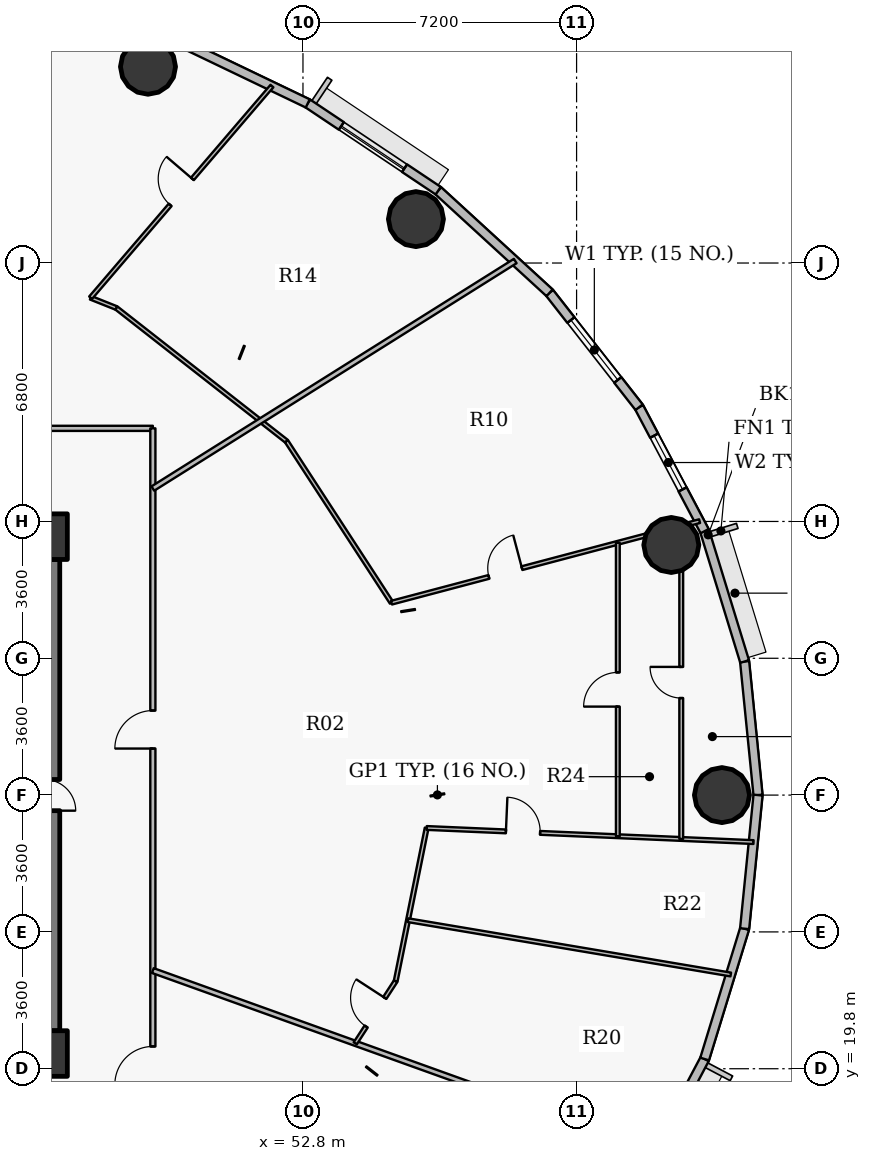
"""IFC4 building model, lengths in metres.
Left out: names, types, materials, properties, quantities, classifications, styles, units other than length and angle.
Written with IfcOpenShell. Run it as: python <this file> out.ifc"""

import sys

from ifc_helpers import new_model, si_unit, direction, frame, frame_2d, origin, origin_2d, place, context, subcontext, project, spatial, rectangle, hollow_circle, extrude, source, transform, mapped, element, fill, save


model = new_model("IFC4")
c1 = context("Model", 3, precision=1e-05, world=origin(), true_north=direction((0.0, 1.0)))
c2 = subcontext(c1, "Body", "Model", "MODEL_VIEW")
j1 = project(units=[si_unit("LENGTHUNIT", "METRE"), si_unit("PLANEANGLEUNIT", "RADIAN")], contexts=[c1])
p1 = place(None, origin())
s1 = spatial("IfcSite", under=j1, at=p1, CompositionType="ELEMENT")
p2 = place(p1, origin())
s2 = spatial("IfcBuilding", under=s1, at=p2, CompositionType="ELEMENT")
p3 = place(p2, frame((0.0, 0.0, 115.95)))
s3 = spatial("IfcBuildingStorey", under=s2, at=p3, CompositionType="ELEMENT", Elevation=115.95)
for number, where, z_axis, x_axis in (
    (1, (46.0, 20.2, 0.0), (0.0, 0.0, 1.0), (1.0, 0.0, 0.0)),
    (2, (46.0, 33.8, 0.0), (0.0, 0.0, 1.0), (1.0, 0.0, 0.0)),
):
    element("IfcColumn", number, at=place(p3, frame(where, z_axis=z_axis, x_axis=x_axis)), inside=s3, PredefinedType="COLUMN", context=c2, shape_type="SweptSolid", body=[
        extrude(rectangle(XDim=1.2, YDim=1.2, at=origin_2d()), origin(), (0.0, 0.0, 1.0), 3.75),
    ])
p4 = place(p3, frame((46.0, 33.2, 0.0), z_axis=(0.0, 0.0, 1.0), x_axis=(0.0, -1.0, 0.0)))
e3 = element("IfcWall", 3, at=p4, inside=s3, PredefinedType="SHEAR", context=c2, shape_type="SweptSolid", body=[
    extrude(rectangle(XDim=12.4, YDim=0.8, at=frame_2d((6.2, 0.0))), origin(), (0.0, 0.0, 1.0), 2.95),
])
p5 = place(p4, frame((5.79, 0.0, 0.0)))
e4 = element("IfcOpeningElement", 4, at=p5, cuts=e3, PredefinedType="OPENING", context=c2, shape_type="SweptSolid", body=[
    extrude(rectangle(XDim=0.82, YDim=2.1, at=origin_2d()), frame((0.41, 0.41, 1.05), z_axis=(0.0, -1.0, 0.0), x_axis=(1.0, 0.0, 0.0)), (0.0, 0.0, 1.0), 0.82),
])
for number, where, z_axis, x_axis in (
    (5, (63.825, 27.0, 0.0), (0.0, 0.0, 1.0), (1.0, 0.0, 0.0)),
    (6, (62.493, 33.581, 0.0), (0.0, 0.0, 1.0), (1.0, 0.0, 0.0)),
    (7, (55.773, 42.156, 0.0), (0.0, 0.0, 1.0), (1.0, 0.0, 0.0)),
    (8, (48.722, 46.165, 0.0), (0.0, 0.0, 1.0), (1.0, 0.0, 0.0)),
):
    element("IfcColumn", number, at=place(p3, frame(where, z_axis=z_axis, x_axis=x_axis)), inside=s3, PredefinedType="COLUMN", context=c2, shape_type="SweptSolid", body=[
        extrude(hollow_circle(Radius=0.725, WallThickness=0.042, at=origin_2d()), origin(), (0.0, 0.0, 1.0), 3.75),
    ])
p6 = place(p3, frame((64.422, 30.515, 0.0), z_axis=(0.0, 0.0, 1.0), x_axis=(0.099989468229, -0.994988495533, 0.0)))
e9 = element("IfcWall", 9, at=p6, inside=s3, PredefinedType="SOLIDWALL", context=c2, shape_type="SweptSolid", body=[
    extrude(rectangle(XDim=3.533, YDim=0.24, at=frame_2d((1.767, 0.0))), origin(), (0.0, 0.0, 1.0), 3.5),
])
p7 = place(p3, frame((63.37, 33.945, 0.0), z_axis=(0.0, 0.0, 1.0), x_axis=(0.293124431344, -0.956074300329, 0.0)))
e10 = element("IfcWall", 10, at=p7, inside=s3, PredefinedType="SOLIDWALL", context=c2, shape_type="SweptSolid", body=[
    extrude(rectangle(XDim=3.587, YDim=0.24, at=frame_2d((1.793, 0.0))), origin(), (0.0, 0.0, 1.0), 3.5),
])
p8 = place(p3, frame((61.645, 37.206, 0.0), z_axis=(0.0, 0.0, 1.0), x_axis=(0.467614004126, -0.883932770716, 0.0)))
e11 = element("IfcWall", 11, at=p8, inside=s3, PredefinedType="SOLIDWALL", context=c2, shape_type="SweptSolid", body=[
    extrude(rectangle(XDim=3.689, YDim=0.24, at=frame_2d((1.844, 0.0))), origin(), (0.0, 0.0, 1.0), 3.5),
])
p9 = place(p8, frame((0.846, 0.0, 0.9)))
e12 = element("IfcOpeningElement", 12, at=p9, cuts=e11, PredefinedType="OPENING", context=c2, shape_type="SweptSolid", body=[
    extrude(rectangle(XDim=1.6, YDim=1.75, at=origin_2d()), frame((0.8, 0.13, 0.875), z_axis=(0.0, -1.0, 0.0), x_axis=(1.0, 0.0, 0.0)), (0.0, 0.0, 1.0), 0.26),
])
p10 = place(p3, frame((59.289, 40.217, 0.0), z_axis=(0.0, 0.0, 1.0), x_axis=(0.616272103517, -0.787533297345, 0.0)))
e13 = element("IfcWall", 13, at=p10, inside=s3, PredefinedType="SOLIDWALL", context=c2, shape_type="SweptSolid", body=[
    extrude(rectangle(XDim=3.823, YDim=0.24, at=frame_2d((1.912, 0.0))), origin(), (0.0, 0.0, 1.0), 3.5),
])
p11 = place(p10, frame((0.912, 0.0, 0.9)))
e14 = element("IfcOpeningElement", 14, at=p11, cuts=e13, PredefinedType="OPENING", context=c2, shape_type="SweptSolid", body=[
    extrude(rectangle(XDim=2.0, YDim=1.75, at=origin_2d()), frame((1.0, 0.13, 0.875), z_axis=(0.0, -1.0, 0.0), x_axis=(1.0, 0.0, 0.0)), (0.0, 0.0, 1.0), 0.26),
])
p12 = place(p3, frame((56.358, 42.903, 0.0), z_axis=(0.0, 0.0, 1.0), x_axis=(0.737113356241, -0.675769117414, 0.0)))
e15 = element("IfcWall", 15, at=p12, inside=s3, PredefinedType="SOLIDWALL", context=c2, shape_type="SweptSolid", body=[
    extrude(rectangle(XDim=3.976, YDim=0.24, at=frame_2d((1.988, 0.0))), origin(), (0.0, 0.0, 1.0), 3.5),
])
p13 = place(p3, frame((52.925, 45.199, 0.0), z_axis=(0.0, 0.0, 1.0), x_axis=(0.831221811447, -0.555940914284, 0.0)))
e16 = element("IfcWall", 16, at=p13, inside=s3, PredefinedType="SOLIDWALL", context=c2, shape_type="SweptSolid", body=[
    extrude(rectangle(XDim=4.13, YDim=0.24, at=frame_2d((2.065, 0.0))), origin(), (0.0, 0.0, 1.0), 3.5),
])
p14 = place(p13, frame((1.065, 0.0, 0.9)))
e17 = element("IfcOpeningElement", 17, at=p14, cuts=e16, PredefinedType="OPENING", context=c2, shape_type="SweptSolid", body=[
    extrude(rectangle(XDim=2.0, YDim=1.75, at=origin_2d()), frame((1.0, 0.13, 0.875), z_axis=(0.0, -1.0, 0.0), x_axis=(1.0, 0.0, 0.0)), (0.0, 0.0, 1.0), 0.26),
])
p15 = place(p3, frame((49.074, 47.047, 0.0), z_axis=(0.0, 0.0, 1.0), x_axis=(0.901589935876, -0.432591709962, 0.0)))
e18 = element("IfcWall", 18, at=p15, inside=s3, PredefinedType="SOLIDWALL", context=c2, shape_type="SweptSolid", body=[
    extrude(rectangle(XDim=4.272, YDim=0.24, at=frame_2d((2.136, 0.0))), origin(), (0.0, 0.0, 1.0), 3.5),
])
p16 = place(p3, frame((63.37, 20.055, 0.0), z_axis=(0.0, 0.0, 1.0), x_axis=(-0.467614004126, -0.883932770716, 0.0)))
e19 = element("IfcWall", 19, at=p16, inside=s3, PredefinedType="SOLIDWALL", context=c2, shape_type="SweptSolid", body=[
    extrude(rectangle(XDim=3.689, YDim=0.24, at=frame_2d((1.844, 0.0))), origin(), (0.0, 0.0, 1.0), 3.5),
])
p17 = place(p16, frame((0.778, 0.0, 0.9)))
e20 = element("IfcOpeningElement", 20, at=p17, cuts=e19, PredefinedType="OPENING", context=c2, shape_type="SweptSolid", body=[
    extrude(rectangle(XDim=1.6, YDim=1.75, at=origin_2d()), frame((0.8, 0.13, 0.875), z_axis=(0.0, -1.0, 0.0), x_axis=(1.0, 0.0, 0.0)), (0.0, 0.0, 1.0), 0.26),
])
p18 = place(p3, frame((64.422, 23.485, 0.0), z_axis=(0.0, 0.0, 1.0), x_axis=(-0.293124431344, -0.956074300329, 0.0)))
e21 = element("IfcWall", 21, at=p18, inside=s3, PredefinedType="SOLIDWALL", context=c2, shape_type="SweptSolid", body=[
    extrude(rectangle(XDim=3.587, YDim=0.24, at=frame_2d((1.793, 0.0))), origin(), (0.0, 0.0, 1.0), 3.5),
])
p19 = place(p3, frame((64.775, 27.0, 0.0), z_axis=(0.0, 0.0, 1.0), x_axis=(-0.099989468229, -0.994988495533, 0.0)))
e22 = element("IfcWall", 22, at=p19, inside=s3, PredefinedType="SOLIDWALL", context=c2, shape_type="SweptSolid", body=[
    extrude(rectangle(XDim=3.533, YDim=0.24, at=frame_2d((1.767, 0.0))), origin(), (0.0, 0.0, 1.0), 3.5),
])
p20 = place(p3, frame((38.477, 36.65, 0.0), z_axis=(0.0, 0.0, 1.0), x_axis=(1.0, 0.0, 0.0)))
e23 = element("IfcWall", 23, at=p20, inside=s3, PredefinedType="PARTITIONING", context=c2, shape_type="SweptSolid", body=[
    extrude(rectangle(XDim=10.373, YDim=0.135, at=frame_2d((5.187, 0.0))), origin(), (0.0, 0.0, 1.0), 2.935),
])
p21 = place(p20, frame((5.621, 0.0, 0.0)))
e24 = element("IfcOpeningElement", 24, at=p21, cuts=e23, PredefinedType="OPENING", context=c2, shape_type="SweptSolid", body=[
    extrude(rectangle(XDim=1.0, YDim=2.15, at=origin_2d()), frame((0.5, 0.078, 1.075), z_axis=(0.0, -1.0, 0.0), x_axis=(1.0, 0.0, 0.0)), (0.0, 0.0, 1.0), 0.155),
])
p22 = place(p3, frame((47.212, 40.087, 0.0), z_axis=(0.0, 0.0, 1.0), x_axis=(0.928752817467, -0.370699614307, 0.0)))
e25 = element("IfcWall", 25, at=p22, inside=s3, PredefinedType="PARTITIONING", context=c2, shape_type="SweptSolid", body=[
    extrude(rectangle(XDim=0.731, YDim=0.1, at=frame_2d((0.365, 0.0))), origin(), (0.0, 0.0, 1.0), 3.185),
])
p23 = place(p3, frame((47.212, 40.087, 0.0), z_axis=(0.0, 0.0, 1.0), x_axis=(0.650621399292, 0.759402261508, 0.0)))
e26 = element("IfcWall", 26, at=p23, inside=s3, PredefinedType="PARTITIONING", context=c2, shape_type="SweptSolid", body=[
    extrude(rectangle(XDim=7.334, YDim=0.1, at=frame_2d((3.667, 0.0))), origin(), (0.0, 0.0, 1.0), 2.935),
])
p24 = place(p23, frame((3.217, 0.0, 0.0)))
e27 = element("IfcOpeningElement", 27, at=p24, cuts=e26, PredefinedType="OPENING", context=c2, shape_type="SweptSolid", body=[
    extrude(rectangle(XDim=0.9, YDim=2.1, at=origin_2d()), frame((0.45, 0.06, 1.05), z_axis=(0.0, -1.0, 0.0), x_axis=(1.0, 0.0, 0.0)), (0.0, 0.0, 1.0), 0.12),
])
p25 = place(p3, frame((47.891, 39.816, 0.0), z_axis=(0.0, 0.0, 1.0), x_axis=(0.787338202739, -0.616521333376, 0.0)))
e28 = element("IfcWall", 28, at=p25, inside=s3, PredefinedType="PARTITIONING", context=c2, shape_type="SweptSolid", body=[
    extrude(rectangle(XDim=5.684, YDim=0.1, at=frame_2d((2.842, 0.0))), origin(), (0.0, 0.0, 1.0), 2.935),
])
p26 = place(p3, frame((48.85, 17.35, 0.0), z_axis=(0.0, 0.0, 1.0), x_axis=(0.0, 1.0, 0.0)))
e29 = element("IfcWall", 29, at=p26, inside=s3, PredefinedType="PARTITIONING", context=c2, shape_type="SweptSolid", body=[
    extrude(rectangle(XDim=19.3, YDim=0.135, at=frame_2d((9.65, 0.0))), origin(), (0.0, 0.0, 1.0), 2.935),
])
p27 = place(p26, frame((2.036, 0.0, 0.0)))
e30 = element("IfcOpeningElement", 30, at=p27, cuts=e29, PredefinedType="OPENING", context=c2, shape_type="SweptSolid", body=[
    extrude(rectangle(XDim=1.0, YDim=2.15, at=origin_2d()), frame((0.5, 0.078, 1.075), z_axis=(0.0, -1.0, 0.0), x_axis=(1.0, 0.0, 0.0)), (0.0, 0.0, 1.0), 0.155),
])
p28 = place(p26, frame((10.875, 0.0, 0.0)))
e31 = element("IfcOpeningElement", 31, at=p28, cuts=e29, PredefinedType="OPENING", context=c2, shape_type="SweptSolid", body=[
    extrude(rectangle(XDim=1.0, YDim=2.15, at=origin_2d()), frame((0.5, 0.078, 1.075), z_axis=(0.0, -1.0, 0.0), x_axis=(1.0, 0.0, 0.0)), (0.0, 0.0, 1.0), 0.155),
])
p29 = place(p3, frame((48.85, 22.383, 0.0), z_axis=(0.0, 0.0, 1.0), x_axis=(0.941089213164, -0.338158384292, 0.0)))
e32 = element("IfcWall", 32, at=p29, inside=s3, PredefinedType="PARTITIONING", context=c2, shape_type="SweptSolid", body=[
    extrude(rectangle(XDim=14.069, YDim=0.135, at=frame_2d((7.035, 0.0))), origin(), (0.0, 0.0, 1.0), 2.935),
])
p30 = place(p3, frame((48.85, 35.066, 0.0), z_axis=(0.0, 0.0, 1.0), x_axis=(0.846963568038, 0.531650932866, 0.0)))
e33 = element("IfcWall", 33, at=p30, inside=s3, PredefinedType="PARTITIONING", context=c2, shape_type="SweptSolid", body=[
    extrude(rectangle(XDim=11.258, YDim=0.135, at=frame_2d((5.629, 0.0))), origin(), (0.0, 0.0, 1.0), 2.935),
])
p31 = place(p3, frame((52.366, 36.311, 0.0), z_axis=(0.0, 0.0, 1.0), x_axis=(0.545394651961, -0.838179380331, 0.0)))
e34 = element("IfcWall", 34, at=p31, inside=s3, PredefinedType="PARTITIONING", context=c2, shape_type="SweptSolid", body=[
    extrude(rectangle(XDim=5.068, YDim=0.1, at=frame_2d((2.534, 0.0))), origin(), (0.0, 0.0, 1.0), 3.5),
])
p32 = place(p3, frame((54.176, 20.469, 0.0), z_axis=(0.0, 0.0, 1.0), x_axis=(0.545370803514, 0.838194897786, 0.0)))
e35 = element("IfcWall", 35, at=p32, inside=s3, PredefinedType="PARTITIONING", context=c2, shape_type="SweptSolid", body=[
    extrude(rectangle(XDim=1.952, YDim=0.1, at=frame_2d((0.976, 0.0))), origin(), (0.0, 0.0, 1.0), 3.5),
])
p33 = place(p32, frame((0.526, 0.0, 0.0)))
e36 = element("IfcOpeningElement", 36, at=p33, cuts=e35, PredefinedType="OPENING", context=c2, shape_type="SweptSolid", body=[
    extrude(rectangle(XDim=0.9, YDim=2.1, at=origin_2d()), frame((0.45, 0.06, 1.05), z_axis=(0.0, -1.0, 0.0), x_axis=(1.0, 0.0, 0.0)), (0.0, 0.0, 1.0), 0.12),
])
p34 = place(p3, frame((55.131, 32.063, 0.0), z_axis=(0.0, 0.0, 1.0), x_axis=(0.96671793708, 0.255844542893, 0.0)))
e37 = element("IfcWall", 37, at=p34, inside=s3, PredefinedType="PARTITIONING", context=c2, shape_type="SweptSolid", body=[
    extrude(rectangle(XDim=8.385, YDim=0.1, at=frame_2d((4.192, 0.0))), origin(), (0.0, 0.0, 1.0), 2.935),
])
p35 = place(p34, frame((2.65, 0.0, 0.0)))
e38 = element("IfcOpeningElement", 38, at=p35, cuts=e37, PredefinedType="OPENING", context=c2, shape_type="SweptSolid", body=[
    extrude(rectangle(XDim=0.9, YDim=2.1, at=origin_2d()), frame((0.45, 0.06, 1.05), z_axis=(0.0, -1.0, 0.0), x_axis=(1.0, 0.0, 0.0)), (0.0, 0.0, 1.0), 0.12),
])
p36 = place(p3, frame((55.24, 22.105, 0.0), z_axis=(0.0, 0.0, 1.0), x_axis=(0.198205355444, 0.980160515973, 0.0)))
e39 = element("IfcWall", 39, at=p36, inside=s3, PredefinedType="PARTITIONING", context=c2, shape_type="SweptSolid", body=[
    extrude(rectangle(XDim=4.112, YDim=0.1, at=frame_2d((2.056, 0.0))), origin(), (0.0, 0.0, 1.0), 3.5),
])
p37 = place(p3, frame((55.564, 23.708, 0.0), z_axis=(0.0, 0.0, 1.0), x_axis=(0.986139151265, -0.165920385556, 0.0)))
e40 = element("IfcWall", 40, at=p37, inside=s3, PredefinedType="PARTITIONING", context=c2, shape_type="SweptSolid", body=[
    extrude(rectangle(XDim=8.612, YDim=0.1, at=frame_2d((4.306, 0.0))), origin(), (0.0, 0.0, 1.0), 2.935),
])
p38 = place(p3, frame((56.055, 26.135, 0.0), z_axis=(0.0, 0.0, 1.0), x_axis=(0.999070497197, -0.043106166957, 0.0)))
e41 = element("IfcWall", 41, at=p38, inside=s3, PredefinedType="PARTITIONING", context=c2, shape_type="SweptSolid", body=[
    extrude(rectangle(XDim=8.609, YDim=0.1, at=frame_2d((4.304, 0.0))), origin(), (0.0, 0.0, 1.0), 2.935),
])
p39 = place(p38, frame((2.088, 0.0, 0.0)))
e42 = element("IfcOpeningElement", 42, at=p39, cuts=e41, PredefinedType="OPENING", context=c2, shape_type="SweptSolid", body=[
    extrude(rectangle(XDim=0.9, YDim=2.1, at=origin_2d()), frame((0.45, 0.06, 1.05), z_axis=(0.0, -1.0, 0.0), x_axis=(1.0, 0.0, 0.0)), (0.0, 0.0, 1.0), 0.12),
])
p40 = place(p3, frame((61.085, 25.918, 0.0), z_axis=(0.0, 0.0, 1.0), x_axis=(0.0, 1.0, 0.0)))
e43 = element("IfcWall", 43, at=p40, inside=s3, PredefinedType="PARTITIONING", context=c2, shape_type="SweptSolid", body=[
    extrude(rectangle(XDim=7.721, YDim=0.1, at=frame_2d((3.861, 0.0))), origin(), (0.0, 0.0, 1.0), 2.935),
])
p41 = place(p40, frame((3.411, 0.0, 0.0)))
e44 = element("IfcOpeningElement", 44, at=p41, cuts=e43, PredefinedType="OPENING", context=c2, shape_type="SweptSolid", body=[
    extrude(rectangle(XDim=0.9, YDim=2.1, at=origin_2d()), frame((0.45, 0.06, 1.05), z_axis=(0.0, -1.0, 0.0), x_axis=(1.0, 0.0, 0.0)), (0.0, 0.0, 1.0), 0.12),
])
p42 = place(p3, frame((62.754, 25.846, 0.0), z_axis=(0.0, 0.0, 1.0), x_axis=(0.0, 1.0, 0.0)))
e45 = element("IfcWall", 45, at=p42, inside=s3, PredefinedType="PARTITIONING", context=c2, shape_type="SweptSolid", body=[
    extrude(rectangle(XDim=8.235, YDim=0.1, at=frame_2d((4.117, 0.0))), origin(), (0.0, 0.0, 1.0), 2.935),
])
p43 = place(p42, frame((3.708, 0.0, 0.0)))
e46 = element("IfcOpeningElement", 46, at=p43, cuts=e45, PredefinedType="OPENING", context=c2, shape_type="SweptSolid", body=[
    extrude(rectangle(XDim=0.82, YDim=2.1, at=origin_2d()), frame((0.41, 0.06, 1.05), z_axis=(0.0, -1.0, 0.0), x_axis=(1.0, 0.0, 0.0)), (0.0, 0.0, 1.0), 0.12),
])
for number, where, z_axis, x_axis in (
    (47, (46.4, 34.2, 0.0), (0.0, 0.0, 1.0), (-1.0, 0.0, 0.0)),
    (48, (45.41, 19.8, 0.0), (0.0, 0.0, 1.0), (1.0, 0.0, 0.0)),
):
    element("IfcWall", number, at=place(p3, frame(where, z_axis=z_axis, x_axis=x_axis)), inside=s3, PredefinedType="PARTITIONING", context=c2, shape_type="SweptSolid", body=[
        extrude(rectangle(XDim=0.99, YDim=0.135, at=frame_2d((0.495, 0.0))), origin(), (0.0, 0.0, 1.0), 2.935),
    ])
for number, where, z_axis, x_axis in (
    (49, (46.4, 20.107, 0.0), (0.0, 0.0, 1.0), (0.0, 1.0, 0.0)),
    (50, (46.4, 33.21, 0.0), (0.0, 0.0, 1.0), (0.0, 1.0, 0.0)),
):
    element("IfcWall", number, at=place(p3, frame(where, z_axis=z_axis, x_axis=x_axis)), inside=s3, PredefinedType="PARTITIONING", context=c2, shape_type="SweptSolid", body=[
        extrude(rectangle(XDim=0.683, YDim=0.135, at=frame_2d((0.341, 0.0))), origin(), (0.0, 0.0, 1.0), 3.5),
    ])
m1 = source(origin(), c2, "Body", "SweptSolid", [
    extrude(rectangle(XDim=1.6, YDim=1.75, at=origin_2d()), frame((0.8, 0.03, 0.875), z_axis=(0.0, -1.0, 0.0), x_axis=(1.0, 0.0, 0.0)), (0.0, 0.0, 1.0), 0.06),
])
p44 = place(p9, origin())
e51 = element("IfcWindow", 51, at=p44, inside=s3, PartitioningType="DOUBLE_PANEL_VERTICAL", PredefinedType="WINDOW", context=c2, shape_type="MappedRepresentation", body=[
    mapped(m1, transform((0.0, 0.0, 0.0), x_axis=(1.0, 0.0, 0.0), y_axis=(0.0, 1.0, 0.0), z_axis=(0.0, 0.0, 1.0), scale=1.0)),
])
fill(e12, e51)
m2 = source(origin(), c2, "Body", "SweptSolid", [
    extrude(rectangle(XDim=2.0, YDim=1.75, at=origin_2d()), frame((1.0, 0.03, 0.875), z_axis=(0.0, -1.0, 0.0), x_axis=(1.0, 0.0, 0.0)), (0.0, 0.0, 1.0), 0.06),
])
p45 = place(p11, origin())
e52 = element("IfcWindow", 52, at=p45, inside=s3, PartitioningType="DOUBLE_PANEL_VERTICAL", PredefinedType="WINDOW", context=c2, shape_type="MappedRepresentation", body=[
    mapped(m2, transform((0.0, 0.0, 0.0), x_axis=(1.0, 0.0, 0.0), y_axis=(0.0, 1.0, 0.0), z_axis=(0.0, 0.0, 1.0), scale=1.0)),
])
fill(e14, e52)
p46 = place(p14, origin())
e53 = element("IfcWindow", 53, at=p46, inside=s3, PartitioningType="DOUBLE_PANEL_VERTICAL", PredefinedType="WINDOW", context=c2, shape_type="MappedRepresentation", body=[
    mapped(m2, transform((0.0, 0.0, 0.0), x_axis=(1.0, 0.0, 0.0), y_axis=(0.0, 1.0, 0.0), z_axis=(0.0, 0.0, 1.0), scale=1.0)),
])
fill(e17, e53)
m3 = source(origin(), c2, "Body", "SweptSolid", [
    extrude(rectangle(XDim=1.0, YDim=2.15, at=origin_2d()), frame((0.5, 0.025, 1.075), z_axis=(0.0, -1.0, 0.0), x_axis=(1.0, 0.0, 0.0)), (0.0, 0.0, 1.0), 0.05),
])
p47 = place(p27, origin())
e54 = element("IfcDoor", 54, at=p47, inside=s3, OperationType="SINGLE_SWING_LEFT", PredefinedType="DOOR", context=c2, shape_type="MappedRepresentation", body=[
    mapped(m3, transform((0.0, 0.0, 0.0), x_axis=(1.0, 0.0, 0.0), y_axis=(0.0, 1.0, 0.0), z_axis=(0.0, 0.0, 1.0), scale=1.0)),
])
fill(e30, e54)
p48 = place(p28, origin())
e55 = element("IfcDoor", 55, at=p48, inside=s3, OperationType="SINGLE_SWING_LEFT", PredefinedType="DOOR", context=c2, shape_type="MappedRepresentation", body=[
    mapped(m3, transform((0.0, 0.0, 0.0), x_axis=(1.0, 0.0, 0.0), y_axis=(0.0, 1.0, 0.0), z_axis=(0.0, 0.0, 1.0), scale=1.0)),
])
fill(e31, e55)
m4 = source(origin(), c2, "Body", "SweptSolid", [
    extrude(rectangle(XDim=0.9, YDim=2.1, at=origin_2d()), frame((0.45, 0.025, 1.05), z_axis=(0.0, -1.0, 0.0), x_axis=(1.0, 0.0, 0.0)), (0.0, 0.0, 1.0), 0.05),
])
p49 = place(p33, origin())
e56 = element("IfcDoor", 56, at=p49, inside=s3, OperationType="SINGLE_SWING_RIGHT", PredefinedType="DOOR", context=c2, shape_type="MappedRepresentation", body=[
    mapped(m4, transform((0.0, 0.0, 0.0), x_axis=(1.0, 0.0, 0.0), y_axis=(0.0, 1.0, 0.0), z_axis=(0.0, 0.0, 1.0), scale=1.0)),
])
fill(e36, e56)
p50 = place(p39, origin())
e57 = element("IfcDoor", 57, at=p50, inside=s3, OperationType="SINGLE_SWING_LEFT", PredefinedType="DOOR", context=c2, shape_type="MappedRepresentation", body=[
    mapped(m4, transform((0.0, 0.0, 0.0), x_axis=(1.0, 0.0, 0.0), y_axis=(0.0, 1.0, 0.0), z_axis=(0.0, 0.0, 1.0), scale=1.0)),
])
fill(e42, e57)
p51 = place(p35, origin())
e58 = element("IfcDoor", 58, at=p51, inside=s3, OperationType="SINGLE_SWING_RIGHT", PredefinedType="DOOR", context=c2, shape_type="MappedRepresentation", body=[
    mapped(m4, transform((0.0, 0.0, 0.0), x_axis=(1.0, 0.0, 0.0), y_axis=(0.0, 1.0, 0.0), z_axis=(0.0, 0.0, 1.0), scale=1.0)),
])
fill(e38, e58)
p52 = place(p41, origin())
e59 = element("IfcDoor", 59, at=p52, inside=s3, OperationType="SINGLE_SWING_LEFT", PredefinedType="DOOR", context=c2, shape_type="MappedRepresentation", body=[
    mapped(m4, transform((0.0, 0.0, 0.0), x_axis=(1.0, 0.0, 0.0), y_axis=(0.0, 1.0, 0.0), z_axis=(0.0, 0.0, 1.0), scale=1.0)),
])
fill(e44, e59)
m5 = source(origin(), c2, "Body", "SweptSolid", [
    extrude(rectangle(XDim=0.82, YDim=2.1, at=origin_2d()), frame((0.41, 0.025, 1.05), z_axis=(0.0, -1.0, 0.0), x_axis=(1.0, 0.0, 0.0)), (0.0, 0.0, 1.0), 0.05),
])
p53 = place(p43, origin())
e60 = element("IfcDoor", 60, at=p53, inside=s3, OperationType="SINGLE_SWING_RIGHT", PredefinedType="DOOR", context=c2, shape_type="MappedRepresentation", body=[
    mapped(m5, transform((0.0, 0.0, 0.0), x_axis=(1.0, 0.0, 0.0), y_axis=(0.0, 1.0, 0.0), z_axis=(0.0, 0.0, 1.0), scale=1.0)),
])
fill(e46, e60)
p54 = place(p24, origin())
e61 = element("IfcDoor", 61, at=p54, inside=s3, OperationType="SINGLE_SWING_RIGHT", PredefinedType="DOOR", context=c2, shape_type="MappedRepresentation", body=[
    mapped(m4, transform((0.0, 0.0, 0.0), x_axis=(1.0, 0.0, 0.0), y_axis=(0.0, 1.0, 0.0), z_axis=(0.0, 0.0, 1.0), scale=1.0)),
])
fill(e27, e61)
save(model, sys.argv[1])
